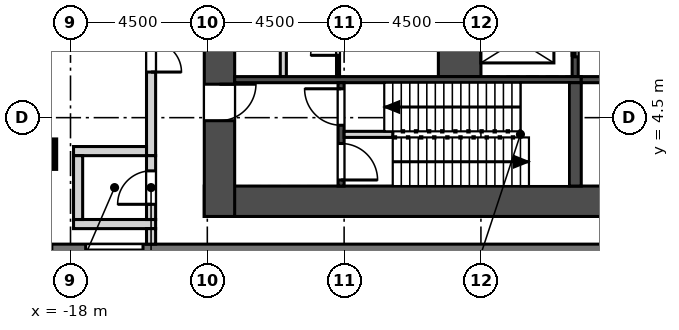
"""IFC4 building model, lengths in metres.
Left out: names, types, materials, properties, quantities, classifications, styles, units other than length and angle.
Written with IfcOpenShell. Run it as: python <this file> out.ifc"""

import sys

from ifc_helpers import new_model, si_unit, direction, frame, frame_2d, origin, origin_2d, place, context, subcontext, project, spatial, rectangle, extrude, element, fill, save


model = new_model("IFC4")
c1 = context("Model", 3, precision=1e-05, world=origin(), true_north=direction((0.0, 1.0)))
c2 = subcontext(c1, "Body", "Model", "MODEL_VIEW")
j1 = project(units=[si_unit("LENGTHUNIT", "METRE"), si_unit("PLANEANGLEUNIT", "RADIAN")], contexts=[c1])
p1 = place(None, origin())
s1 = spatial("IfcSite", under=j1, at=p1, CompositionType="ELEMENT")
p2 = place(p1, origin())
s2 = spatial("IfcBuilding", under=s1, at=p2, CompositionType="ELEMENT")
p3 = place(p2, frame((0.0, 0.0, 218.1)))
s3 = spatial("IfcBuildingStorey", under=s2, at=p3, CompositionType="ELEMENT", Elevation=218.1)
p4 = place(p3, frame((-18.955, 3.299, 0.0), z_axis=(0.0, 0.0, 1.0), x_axis=(1.0, 0.0, 0.0)))
e1 = element("IfcColumn", 1, at=p4, inside=s3, PredefinedType="COLUMN", context=c2, shape_type="SweptSolid", body=[
    extrude(rectangle(XDim=0.9, YDim=0.9, at=origin_2d()), origin(), (0.0, 0.0, 1.0), 5.4),
])
p5 = place(p3, frame((-13.6, 1.75, 0.0), z_axis=(0.0, 0.0, 1.0), x_axis=(1.0, 0.0, 0.0)))
e2 = element("IfcWall", 2, at=p5, inside=s3, PredefinedType="SHEAR", context=c2, shape_type="SweptSolid", body=[
    extrude(rectangle(XDim=27.2, YDim=1.0, at=frame_2d((13.6, 0.0))), origin(), (0.0, 0.0, 1.0), 5.4),
])
p6 = place(p3, frame((-13.1, 10.945, 0.0), z_axis=(0.0, 0.0, 1.0), x_axis=(0.0, -1.0, 0.0)))
e3 = element("IfcWall", 3, at=p6, inside=s3, PredefinedType="SHEAR", context=c2, shape_type="SweptSolid", body=[
    extrude(rectangle(XDim=9.695, YDim=1.0, at=frame_2d((4.848, 0.0))), origin(), (0.0, 0.0, 1.0), 5.4),
])
p7 = place(p6, frame((5.345, 0.0, 0.0)))
e4 = element("IfcOpeningElement", 4, at=p7, cuts=e3, PredefinedType="OPENING", context=c2, shape_type="SweptSolid", body=[
    extrude(rectangle(XDim=1.2, YDim=2.1, at=frame_2d((0.6, 1.05))), frame((0.0, 0.51, 0.0), z_axis=(0.0, -1.0, 0.0), x_axis=(1.0, 0.0, 0.0)), (0.0, 0.0, 1.0), 1.02),
])
p8 = place(p6, frame((1.345, 0.0, 0.0)))
e5 = element("IfcOpeningElement", 5, at=p8, cuts=e3, PredefinedType="OPENING", context=c2, shape_type="SweptSolid", body=[
    extrude(rectangle(XDim=1.2, YDim=2.1, at=frame_2d((0.6, 1.05))), frame((0.0, 0.51, 0.0), z_axis=(0.0, -1.0, 0.0), x_axis=(1.0, 0.0, 0.0)), (0.0, 0.0, 1.0), 1.02),
])
p9 = place(p3, frame((-22.787, 0.17, 0.0), z_axis=(0.0, 0.0, 1.0), x_axis=(1.0, 0.0, 0.0)))
e6 = element("IfcWall", 6, at=p9, inside=s3, PredefinedType="SOLIDWALL", context=c2, shape_type="SweptSolid", body=[
    extrude(rectangle(XDim=45.573, YDim=0.34, at=frame_2d((22.787, 0.0))), origin(), (0.0, 0.0, 1.0), 5.0),
])
p10 = place(p9, frame((2.287, 0.0, 0.9)))
e7 = element("IfcOpeningElement", 7, at=p10, cuts=e6, PredefinedType="OPENING", context=c2, shape_type="SweptSolid", body=[
    extrude(rectangle(XDim=1.885, YDim=3.0, at=frame_2d((0.942, 1.5))), frame((0.0, 0.18, 0.0), z_axis=(0.0, -1.0, 0.0), x_axis=(1.0, 0.0, 0.0)), (0.0, 0.0, 1.0), 0.36),
])
p11 = place(p9, frame((5.287, 0.0, 0.9)))
e8 = element("IfcOpeningElement", 8, at=p11, cuts=e6, PredefinedType="OPENING", context=c2, shape_type="SweptSolid", body=[
    extrude(rectangle(XDim=1.885, YDim=3.0, at=frame_2d((0.942, 1.5))), frame((0.0, 0.18, 0.0), z_axis=(0.0, -1.0, 0.0), x_axis=(1.0, 0.0, 0.0)), (0.0, 0.0, 1.0), 0.36),
])
p12 = place(p9, frame((38.287, 0.0, 0.9)))
e9 = element("IfcOpeningElement", 9, at=p12, cuts=e6, PredefinedType="OPENING", context=c2, shape_type="SweptSolid", body=[
    extrude(rectangle(XDim=1.885, YDim=3.0, at=frame_2d((0.942, 1.5))), frame((0.0, 0.18, 0.0), z_axis=(0.0, -1.0, 0.0), x_axis=(1.0, 0.0, 0.0)), (0.0, 0.0, 1.0), 0.36),
])
p13 = place(p9, frame((41.287, 0.0, 0.9)))
e10 = element("IfcOpeningElement", 10, at=p13, cuts=e6, PredefinedType="OPENING", context=c2, shape_type="SweptSolid", body=[
    extrude(rectangle(XDim=1.885, YDim=3.0, at=frame_2d((0.942, 1.5))), frame((0.0, 0.18, 0.0), z_axis=(0.0, -1.0, 0.0), x_axis=(1.0, 0.0, 0.0)), (0.0, 0.0, 1.0), 0.36),
])
p14 = place(p3, frame((-11.0, 5.85, 0.0), z_axis=(0.0, 0.0, 1.0), x_axis=(0.0, 1.0, 0.0)))
e11 = element("IfcWall", 11, at=p14, inside=s3, PredefinedType="SOLIDWALL", context=c2, shape_type="SweptSolid", body=[
    extrude(rectangle(XDim=7.4, YDim=0.2, at=frame_2d((3.7, 0.0))), origin(), (0.0, 0.0, 1.0), 5.0),
])
p15 = place(p3, frame((-1.4, 5.85, -0.4), z_axis=(0.0, 0.0, 1.0), x_axis=(0.0, 1.0, 0.0)))
e12 = element("IfcWall", 12, at=p15, inside=s3, PredefinedType="SOLIDWALL", context=c2, shape_type="SweptSolid", body=[
    extrude(rectangle(XDim=11.75, YDim=0.2, at=frame_2d((5.875, 0.0))), origin(), (0.0, 0.0, 1.0), 5.4),
])
p16 = place(p15, frame((0.65, 0.0, 0.4)))
e13 = element("IfcOpeningElement", 13, at=p16, cuts=e12, PredefinedType="OPENING", context=c2, shape_type="SweptSolid", body=[
    extrude(rectangle(XDim=1.1, YDim=2.1, at=frame_2d((0.55, 1.05))), frame((0.0, 0.11, 0.0), z_axis=(0.0, -1.0, 0.0), x_axis=(1.0, 0.0, 0.0)), (0.0, 0.0, 1.0), 0.22),
])
p17 = place(p15, frame((3.3, 0.0, 0.4)))
e14 = element("IfcOpeningElement", 14, at=p17, cuts=e12, PredefinedType="OPENING", context=c2, shape_type="SweptSolid", body=[
    extrude(rectangle(XDim=1.0, YDim=2.1, at=frame_2d((0.5, 1.05))), frame((0.0, 0.11, 0.0), z_axis=(0.0, -1.0, 0.0), x_axis=(1.0, 0.0, 0.0)), (0.0, 0.0, 1.0), 0.22),
])
p18 = place(p15, frame((5.4, 0.0, 0.4)))
e15 = element("IfcOpeningElement", 15, at=p18, cuts=e12, PredefinedType="OPENING", context=c2, shape_type="SweptSolid", body=[
    extrude(rectangle(XDim=1.0, YDim=2.1, at=frame_2d((0.5, 1.05))), frame((0.0, 0.11, 0.0), z_axis=(0.0, -1.0, 0.0), x_axis=(1.0, 0.0, 0.0)), (0.0, 0.0, 1.0), 0.22),
])
p19 = place(p3, frame((-5.2, 5.85, -0.4), z_axis=(0.0, 0.0, 1.0), x_axis=(0.0, 1.0, 0.0)))
e16 = element("IfcWall", 16, at=p19, inside=s3, PredefinedType="SOLIDWALL", context=c2, shape_type="SweptSolid", body=[
    extrude(rectangle(XDim=2.4, YDim=1.4, at=frame_2d((1.2, 0.0))), origin(), (0.0, 0.0, 1.0), 5.4),
])
p20 = place(p3, frame((-12.6, 5.75, -0.4), z_axis=(0.0, 0.0, 1.0), x_axis=(1.0, 0.0, 0.0)))
e17 = element("IfcWall", 17, at=p20, inside=s3, PredefinedType="SOLIDWALL", context=c2, shape_type="SweptSolid", body=[
    extrude(rectangle(XDim=11.4, YDim=0.2, at=frame_2d((5.7, 0.0))), origin(), (0.0, 0.0, 1.0), 5.4),
])
p21 = place(p3, frame((-1.2, 5.75, -0.4), z_axis=(0.0, 0.0, 1.0), x_axis=(1.0, 0.0, 0.0)))
e18 = element("IfcWall", 18, at=p21, inside=s3, PredefinedType="SOLIDWALL", context=c2, shape_type="SweptSolid", body=[
    extrude(rectangle(XDim=2.4, YDim=0.2, at=frame_2d((1.2, 0.0))), origin(), (0.0, 0.0, 1.0), 5.4),
])
p22 = place(p21, frame((0.7, 0.0, 0.4)))
e19 = element("IfcOpeningElement", 19, at=p22, cuts=e18, PredefinedType="OPENING", context=c2, shape_type="SweptSolid", body=[
    extrude(rectangle(XDim=1.0, YDim=2.1, at=frame_2d((0.5, 1.05))), frame((0.0, 0.11, 0.0), z_axis=(0.0, -1.0, 0.0), x_axis=(1.0, 0.0, 0.0)), (0.0, 0.0, 1.0), 0.22),
])
p23 = place(p3, frame((-9.1, 2.25, -0.4), z_axis=(0.0, 0.0, 1.0), x_axis=(0.0, 1.0, 0.0)))
e20 = element("IfcWall", 20, at=p23, inside=s3, PredefinedType="SOLIDWALL", context=c2, shape_type="SweptSolid", body=[
    extrude(rectangle(XDim=3.4, YDim=0.2, at=frame_2d((1.7, 0.0))), origin(), (0.0, 0.0, 1.0), 5.4),
])
p24 = place(p23, frame((0.2, 0.0, 0.4)))
e21 = element("IfcOpeningElement", 21, at=p24, cuts=e20, PredefinedType="OPENING", context=c2, shape_type="SweptSolid", body=[
    extrude(rectangle(XDim=1.2, YDim=2.1, at=frame_2d((0.6, 1.05))), frame((0.0, 0.11, 0.0), z_axis=(0.0, -1.0, 0.0), x_axis=(1.0, 0.0, 0.0)), (0.0, 0.0, 1.0), 0.22),
])
p25 = place(p23, frame((2.0, 0.0, 0.4)))
e22 = element("IfcOpeningElement", 22, at=p25, cuts=e20, PredefinedType="OPENING", context=c2, shape_type="SweptSolid", body=[
    extrude(rectangle(XDim=1.2, YDim=2.1, at=frame_2d((0.6, 1.05))), frame((0.0, 0.11, 0.0), z_axis=(0.0, -1.0, 0.0), x_axis=(1.0, 0.0, 0.0)), (0.0, 0.0, 1.0), 0.22),
])
p26 = place(p3, frame((-1.4, 2.25, -0.4), z_axis=(0.0, 0.0, 1.0), x_axis=(0.0, 1.0, 0.0)))
e23 = element("IfcWall", 23, at=p26, inside=s3, PredefinedType="SOLIDWALL", context=c2, shape_type="SweptSolid", body=[
    extrude(rectangle(XDim=3.4, YDim=0.4, at=frame_2d((1.7, 0.0))), origin(), (0.0, 0.0, 1.0), 5.4),
])
p27 = place(p3, frame((-9.2, 5.85, 0.0), z_axis=(0.0, 0.0, 1.0), x_axis=(0.0, 1.0, 0.0)))
e24 = element("IfcWall", 24, at=p27, inside=s3, PredefinedType="PARTITIONING", context=c2, shape_type="SweptSolid", body=[
    extrude(rectangle(XDim=2.4, YDim=0.1, at=frame_2d((1.2, 0.0))), origin(), (0.0, 0.0, 1.0), 5.0),
])
p28 = place(p27, frame((0.7, 0.0, 0.0)))
e25 = element("IfcOpeningElement", 25, at=p28, cuts=e24, PredefinedType="OPENING", context=c2, shape_type="SweptSolid", body=[
    extrude(rectangle(XDim=0.9, YDim=2.1, at=frame_2d((0.45, 1.05))), frame((0.0, 0.06, 0.0), z_axis=(0.0, -1.0, 0.0), x_axis=(1.0, 0.0, 0.0)), (0.0, 0.0, 1.0), 0.12),
])
p29 = place(p3, frame((-9.0, 3.95, 0.0), z_axis=(0.0, 0.0, 1.0), x_axis=(1.0, 0.0, 0.0)))
e26 = element("IfcWall", 26, at=p29, inside=s3, PredefinedType="SOLIDWALL", context=c2, shape_type="SweptSolid", body=[
    extrude(rectangle(XDim=1.6, YDim=0.2, at=frame_2d((0.8, 0.0))), origin(), (0.0, 0.0, 1.0), 5.0),
])
p30 = place(p3, frame((-15.35, 3.25, 0.0), z_axis=(0.0, 0.0, 1.0), x_axis=(0.0, 1.0, 0.0)))
e27 = element("IfcWall", 27, at=p30, inside=s3, PredefinedType="SOLIDWALL", context=c2, shape_type="SweptSolid", body=[
    extrude(rectangle(XDim=8.364, YDim=0.3, at=frame_2d((4.182, 0.0))), origin(), (0.0, 0.0, 1.0), 5.0),
])
p31 = place(p30, frame((2.75, 0.0, 0.0)))
e28 = element("IfcOpeningElement", 28, at=p31, cuts=e27, PredefinedType="OPENING", context=c2, shape_type="SweptSolid", body=[
    extrude(rectangle(XDim=2.0, YDim=2.1, at=frame_2d((1.0, 1.05))), frame((0.0, 0.16, 0.0), z_axis=(0.0, -1.0, 0.0), x_axis=(1.0, 0.0, 0.0)), (0.0, 0.0, 1.0), 0.32),
])
p32 = place(p3, frame((-15.2, 1.0, 0.0), z_axis=(0.0, 0.0, 1.0), x_axis=(-1.0, 0.0, 0.0)))
e29 = element("IfcWall", 29, at=p32, inside=s3, PredefinedType="SOLIDWALL", context=c2, shape_type="SweptSolid", body=[
    extrude(rectangle(XDim=2.7, YDim=0.3, at=frame_2d((1.35, 0.0))), origin(), (0.0, 0.0, 1.0), 4.1),
])
p33 = place(p3, frame((-17.9, 3.4, 0.0), z_axis=(0.0, 0.0, 1.0), x_axis=(1.0, 0.0, 0.0)))
e30 = element("IfcWall", 30, at=p33, inside=s3, PredefinedType="SOLIDWALL", context=c2, shape_type="SweptSolid", body=[
    extrude(rectangle(XDim=2.4, YDim=0.3, at=frame_2d((1.2, 0.0))), origin(), (0.0, 0.0, 1.0), 5.0),
])
p34 = place(p3, frame((-17.75, 1.15, 0.0), z_axis=(0.0, 0.0, 1.0), x_axis=(0.0, 1.0, 0.0)))
e31 = element("IfcWall", 31, at=p34, inside=s3, PredefinedType="SOLIDWALL", context=c2, shape_type="SweptSolid", body=[
    extrude(rectangle(XDim=2.1, YDim=0.3, at=frame_2d((1.05, 0.0))), origin(), (0.0, 0.0, 1.0), 5.0),
])
p35 = place(p3, frame((-15.35, 1.15, 0.0), z_axis=(0.0, 0.0, 1.0), x_axis=(0.0, 1.0, 0.0)))
e32 = element("IfcWall", 32, at=p35, inside=s3, PredefinedType="SOLIDWALL", context=c2, shape_type="SweptSolid", body=[
    extrude(rectangle(XDim=2.1, YDim=0.3, at=frame_2d((1.05, 0.0))), origin(), (0.0, 0.0, 1.0), 5.0),
])
p36 = place(p35, frame((0.5, 0.0, 0.0)))
e33 = element("IfcOpeningElement", 33, at=p36, cuts=e32, PredefinedType="OPENING", context=c2, shape_type="SweptSolid", body=[
    extrude(rectangle(XDim=1.1, YDim=2.1, at=frame_2d((0.55, 1.05))), frame((0.0, 0.16, 0.0), z_axis=(0.0, -1.0, 0.0), x_axis=(1.0, 0.0, 0.0)), (0.0, 0.0, 1.0), 0.32),
])
p37 = place(p3, frame((-15.35, 0.34, 0.0), z_axis=(0.0, 0.0, 1.0), x_axis=(0.0, 1.0, 0.0)))
e34 = element("IfcWall", 34, at=p37, inside=s3, PredefinedType="SOLIDWALL", context=c2, shape_type="SweptSolid", body=[
    extrude(rectangle(XDim=0.51, YDim=0.3, at=frame_2d((0.255, 0.0))), origin(), (0.0, 0.0, 1.0), 5.0),
])
p38 = place(p11, origin())
e35 = element("IfcWindow", 35, at=p38, inside=s3, PartitioningType="SINGLE_PANEL", PredefinedType="WINDOW", context=c2, shape_type="SweptSolid", body=[
    extrude(rectangle(XDim=1.885, YDim=3.0, at=frame_2d((0.942, 1.5))), frame((0.0, 0.11, 0.0), z_axis=(0.0, -1.0, 0.0), x_axis=(1.0, 0.0, 0.0)), (0.0, 0.0, 1.0), 0.06),
])
fill(e8, e35)
p39 = place(p16, origin())
e36 = element("IfcDoor", 36, at=p39, inside=s3, OperationType="SLIDING_TO_RIGHT", PredefinedType="DOOR", context=c2, shape_type="SweptSolid", body=[
    extrude(rectangle(XDim=1.1, YDim=2.1, at=frame_2d((0.55, 1.05))), frame((0.0, 0.025, 0.0), z_axis=(0.0, -1.0, 0.0), x_axis=(1.0, 0.0, 0.0)), (0.0, 0.0, 1.0), 0.05),
])
fill(e13, e36)
p40 = place(p28, origin())
e37 = element("IfcDoor", 37, at=p40, inside=s3, OperationType="SINGLE_SWING_LEFT", PredefinedType="DOOR", context=c2, shape_type="SweptSolid", body=[
    extrude(rectangle(XDim=0.9, YDim=2.1, at=frame_2d((0.45, 1.05))), frame((0.0, 0.025, 0.0), z_axis=(0.0, -1.0, 0.0), x_axis=(1.0, 0.0, 0.0)), (0.0, 0.0, 1.0), 0.05),
])
fill(e25, e37)
p41 = place(p7, origin())
e38 = element("IfcDoor", 38, at=p41, inside=s3, OperationType="SINGLE_SWING_LEFT", PredefinedType="DOOR", context=c2, shape_type="SweptSolid", body=[
    extrude(rectangle(XDim=1.2, YDim=2.1, at=frame_2d((0.6, 1.05))), frame((0.0, 0.025, 0.0), z_axis=(0.0, -1.0, 0.0), x_axis=(1.0, 0.0, 0.0)), (0.0, 0.0, 1.0), 0.05),
])
fill(e4, e38)
p42 = place(p24, frame((1.2, 0.0, 0.0), z_axis=(0.0, 0.0, 1.0), x_axis=(-1.0, 0.0, 0.0)))
e39 = element("IfcDoor", 39, at=p42, inside=s3, OperationType="SINGLE_SWING_RIGHT", PredefinedType="DOOR", context=c2, shape_type="SweptSolid", body=[
    extrude(rectangle(XDim=1.2, YDim=2.1, at=frame_2d((0.6, 1.05))), frame((0.0, 0.025, 0.0), z_axis=(0.0, -1.0, 0.0), x_axis=(1.0, 0.0, 0.0)), (0.0, 0.0, 1.0), 0.05),
])
fill(e21, e39)
p43 = place(p25, origin())
e40 = element("IfcDoor", 40, at=p43, inside=s3, OperationType="SINGLE_SWING_RIGHT", PredefinedType="DOOR", context=c2, shape_type="SweptSolid", body=[
    extrude(rectangle(XDim=1.2, YDim=2.1, at=frame_2d((0.6, 1.05))), frame((0.0, 0.025, 0.0), z_axis=(0.0, -1.0, 0.0), x_axis=(1.0, 0.0, 0.0)), (0.0, 0.0, 1.0), 0.05),
])
fill(e22, e40)
p44 = place(p36, origin())
e41 = element("IfcDoor", 41, at=p44, inside=s3, OperationType="SINGLE_SWING_LEFT", PredefinedType="DOOR", context=c2, shape_type="SweptSolid", body=[
    extrude(rectangle(XDim=1.1, YDim=2.1, at=frame_2d((0.55, 1.05))), frame((0.0, 0.025, 0.0), z_axis=(0.0, -1.0, 0.0), x_axis=(1.0, 0.0, 0.0)), (0.0, 0.0, 1.0), 0.05),
])
fill(e33, e41)
p45 = place(p31, frame((2.0, 0.0, 0.0), z_axis=(0.0, 0.0, 1.0), x_axis=(-1.0, 0.0, 0.0)))
e42 = element("IfcDoor", 42, at=p45, inside=s3, OperationType="DOUBLE_DOOR_SINGLE_SWING", PredefinedType="DOOR", context=c2, shape_type="SweptSolid", body=[
    extrude(rectangle(XDim=2.0, YDim=2.1, at=frame_2d((1.0, 1.05))), frame((0.0, 0.025, 0.0), z_axis=(0.0, -1.0, 0.0), x_axis=(1.0, 0.0, 0.0)), (0.0, 0.0, 1.0), 0.05),
])
fill(e28, e42)
save(model, sys.argv[1])
